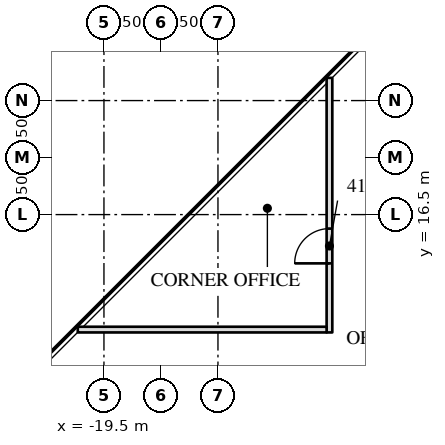
"""IFC4 building model, lengths in metres.
Left out: names, types, materials, properties, quantities, classifications, styles, units other than length and angle.
Written with IfcOpenShell. Run it as: python <this file> out.ifc"""

import sys

from ifc_helpers import new_model, si_unit, direction, frame, frame_2d, origin, place, context, subcontext, project, spatial, rectangle, extrude, element, fill, save


model = new_model("IFC4")
c1 = context("Model", 3, precision=1e-05, world=origin(), true_north=direction((0.0, 1.0)))
c2 = subcontext(c1, "Body", "Model", "MODEL_VIEW")
j1 = project(units=[si_unit("LENGTHUNIT", "METRE"), si_unit("PLANEANGLEUNIT", "RADIAN")], contexts=[c1])
p1 = place(None, origin())
s1 = spatial("IfcSite", under=j1, at=p1, CompositionType="ELEMENT")
p2 = place(p1, origin())
s2 = spatial("IfcBuilding", under=s1, at=p2, CompositionType="ELEMENT")
p3 = place(p2, frame((0.0, 0.0, 174.6)))
s3 = spatial("IfcBuildingStorey", under=s2, at=p3, CompositionType="ELEMENT", Elevation=174.6)
p4 = place(p3, frame((-13.566, 13.399, 0.0), z_axis=(0.0, 0.0, 1.0), x_axis=(0.0, 1.0, 0.0)))
e1 = element("IfcWall", 1, at=p4, inside=s3, PredefinedType="PARTITIONING", context=c2, shape_type="SweptSolid", body=[
    extrude(rectangle(XDim=6.698, YDim=0.15, at=frame_2d((3.349, 0.0))), origin(), (0.0, 0.0, 1.0), 3.91),
])
p5 = place(p4, frame((1.817, 0.0, 0.0)))
e2 = element("IfcOpeningElement", 2, at=p5, cuts=e1, PredefinedType="OPENING", context=c2, shape_type="SweptSolid", body=[
    extrude(rectangle(XDim=0.915, YDim=2.134, at=frame_2d((0.458, 1.067))), frame((0.0, 0.085, 0.0), z_axis=(0.0, -1.0, 0.0), x_axis=(1.0, 0.0, 0.0)), (0.0, 0.0, 1.0), 0.17),
])
p6 = place(p3, frame((-13.641, 13.474, 0.0), z_axis=(0.0, 0.0, 1.0), x_axis=(-1.0, 0.0, 0.0)))
e3 = element("IfcWall", 3, at=p6, inside=s3, PredefinedType="PARTITIONING", context=c2, shape_type="SweptSolid", body=[
    extrude(rectangle(XDim=6.548, YDim=0.15, at=frame_2d((3.274, 0.0))), origin(), (0.0, 0.0, 1.0), 3.91),
])
p7 = place(p5, origin())
e4 = element("IfcDoor", 4, at=p7, inside=s3, OperationType="SINGLE_SWING_LEFT", PredefinedType="DOOR", context=c2, shape_type="SweptSolid", body=[
    extrude(rectangle(XDim=0.915, YDim=2.134, at=frame_2d((0.458, 1.067))), frame((0.0, 0.025, 0.0), z_axis=(0.0, -1.0, 0.0), x_axis=(1.0, 0.0, 0.0)), (0.0, 0.0, 1.0), 0.05),
])
fill(e2, e4)
save(model, sys.argv[1])
